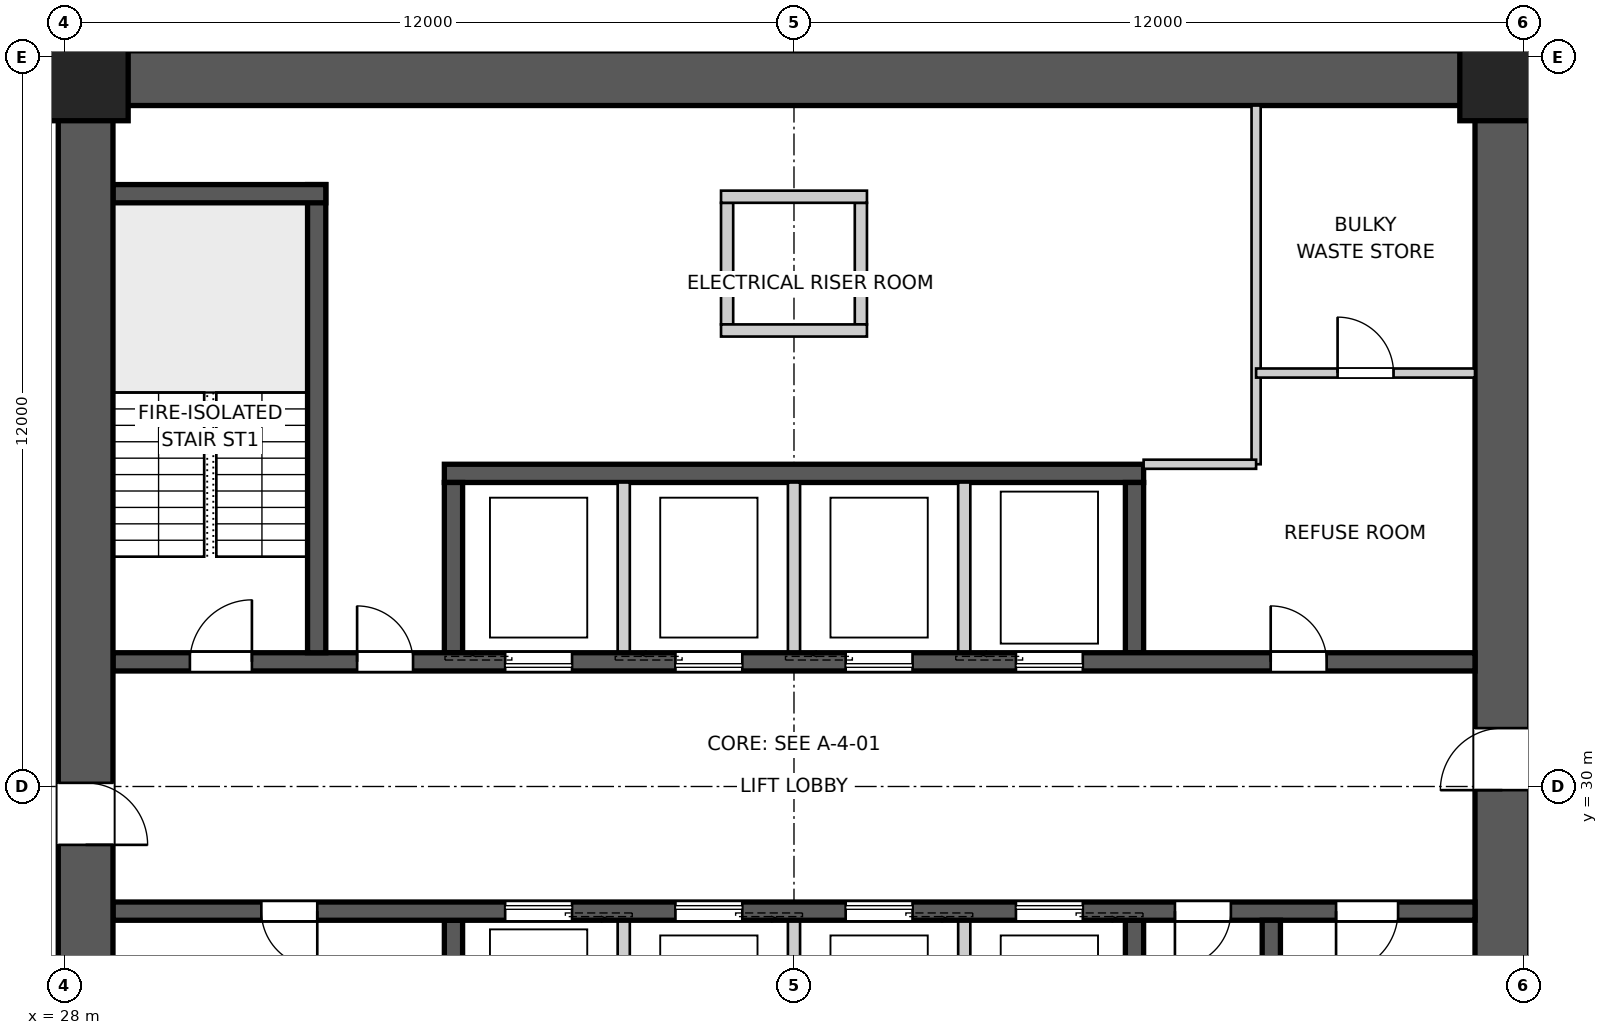
"""IFC4 building model, lengths in metres.
Left out: names, types, materials, properties, quantities, classifications, styles, units other than length and angle.
Written with IfcOpenShell. Run it as: python <this file> out.ifc"""

import sys

from ifc_helpers import new_model, si_unit, direction, frame, frame_2d, origin, origin_2d, place, context, subcontext, project, spatial, polyline, rectangle, outline, extrude, element, fill, save


model = new_model("IFC4")
c1 = context("Model", 3, precision=1e-05, world=origin(), true_north=direction((0.0, 1.0)))
c2 = subcontext(c1, "Body", "Model", "MODEL_VIEW")
j1 = project(units=[si_unit("LENGTHUNIT", "METRE"), si_unit("PLANEANGLEUNIT", "RADIAN")], contexts=[c1])
p1 = place(None, origin())
s1 = spatial("IfcSite", under=j1, at=p1, CompositionType="ELEMENT")
p2 = place(p1, origin())
s2 = spatial("IfcBuilding", under=s1, at=p2, CompositionType="ELEMENT")
p3 = place(p2, frame((0.0, 0.0, -7.4)))
s3 = spatial("IfcBuildingStorey", under=s2, at=p3, CompositionType="ELEMENT", Elevation=-7.4)
p4 = place(p3, frame((28.8, 41.65, -0.4), z_axis=(0.0, 0.0, 1.0), x_axis=(1.0, 0.0, 0.0)))
e1 = element("IfcWall", 1, at=p4, inside=s3, PredefinedType="SHEAR", context=c2, shape_type="SweptSolid", body=[
    extrude(outline(polyline([(0.0, -0.45), (22.4, -0.45), (22.4, -0.025), (22.85, -0.025), (22.85, 0.025), (22.4, 0.025), (22.4, 0.45), (0.0, 0.45), (0.0, 0.025), (-0.45, 0.025), (-0.45, -0.025), (0.0, -0.025), (0.0, -0.45)])), origin(), (0.0, 0.0, 1.0), 4.1),
])
p5 = place(p3, frame((51.65, 18.8, -0.4), z_axis=(0.0, 0.0, 1.0), x_axis=(0.0, 1.0, 0.0)))
e2 = element("IfcWall", 2, at=p5, inside=s3, PredefinedType="SHEAR", context=c2, shape_type="SweptSolid", body=[
    extrude(outline(polyline([(0.0, -0.45), (22.4, -0.45), (22.4, -0.025), (22.85, -0.025), (22.85, 0.025), (22.4, 0.025), (22.4, 0.45), (0.0, 0.45), (0.0, 0.025), (-0.45, 0.025), (-0.45, -0.025), (0.0, -0.025), (0.0, -0.45)])), origin(), (0.0, 0.0, 1.0), 4.1),
])
p6 = place(p5, frame((11.14, 0.0, 0.4)))
e3 = element("IfcOpeningElement", 3, at=p6, cuts=e2, PredefinedType="OPENING", context=c2, shape_type="SweptSolid", body=[
    extrude(rectangle(XDim=1.02, YDim=2.4, at=frame_2d((0.51, 1.2))), frame((0.0, 0.46, 0.0), z_axis=(0.0, -1.0, 0.0), x_axis=(1.0, 0.0, 0.0)), (0.0, 0.0, 1.0), 0.92),
])
p7 = place(p3, frame((28.35, 41.2, -0.4), z_axis=(0.0, 0.0, 1.0), x_axis=(0.0, -1.0, 0.0)))
e4 = element("IfcWall", 4, at=p7, inside=s3, PredefinedType="SHEAR", context=c2, shape_type="SweptSolid", body=[
    extrude(outline(polyline([(0.0, -0.45), (22.4, -0.45), (22.4, -0.025), (22.85, -0.025), (22.85, 0.025), (22.4, 0.025), (22.4, 0.45), (0.0, 0.45), (0.0, 0.025), (-0.45, 0.025), (-0.45, -0.025), (0.0, -0.025), (0.0, -0.45)])), origin(), (0.0, 0.0, 1.0), 4.1),
])
p8 = place(p7, frame((11.14, 0.0, 0.4)))
e5 = element("IfcOpeningElement", 5, at=p8, cuts=e4, PredefinedType="OPENING", context=c2, shape_type="SweptSolid", body=[
    extrude(rectangle(XDim=1.02, YDim=2.4, at=frame_2d((0.51, 1.2))), frame((0.0, 0.46, 0.0), z_axis=(0.0, -1.0, 0.0), x_axis=(1.0, 0.0, 0.0)), (0.0, 0.0, 1.0), 0.92),
])
p9 = place(p3, frame((28.8, 32.05, -0.4), z_axis=(0.0, 0.0, 1.0), x_axis=(1.0, 0.0, 0.0)))
e6 = element("IfcWall", 6, at=p9, inside=s3, PredefinedType="SHEAR", context=c2, shape_type="SweptSolid", body=[
    extrude(rectangle(XDim=22.4, YDim=0.3, at=frame_2d((11.2, 0.0))), origin(), (0.0, 0.0, 1.0), 4.1),
])
p10 = place(p9, frame((19.04, 0.0, 0.4)))
e7 = element("IfcOpeningElement", 7, at=p10, cuts=e6, PredefinedType="OPENING", context=c2, shape_type="SweptSolid", body=[
    extrude(rectangle(XDim=0.92, YDim=2.1, at=frame_2d((0.46, 1.05))), frame((0.0, 0.16, 0.0), z_axis=(0.0, -1.0, 0.0), x_axis=(1.0, 0.0, 0.0)), (0.0, 0.0, 1.0), 0.32),
])
p11 = place(p9, frame((1.265, 0.0, 0.4)))
e8 = element("IfcOpeningElement", 8, at=p11, cuts=e6, PredefinedType="OPENING", context=c2, shape_type="SweptSolid", body=[
    extrude(rectangle(XDim=1.02, YDim=2.1, at=frame_2d((0.51, 1.05))), frame((0.0, 0.16, 0.0), z_axis=(0.0, -1.0, 0.0), x_axis=(1.0, 0.0, 0.0)), (0.0, 0.0, 1.0), 0.32),
])
p12 = place(p9, frame((4.015, 0.0, 0.4)))
e9 = element("IfcOpeningElement", 9, at=p12, cuts=e6, PredefinedType="OPENING", context=c2, shape_type="SweptSolid", body=[
    extrude(rectangle(XDim=0.92, YDim=2.1, at=frame_2d((0.46, 1.05))), frame((0.0, 0.16, 0.0), z_axis=(0.0, -1.0, 0.0), x_axis=(1.0, 0.0, 0.0)), (0.0, 0.0, 1.0), 0.32),
])
p13 = place(p9, frame((6.45, 0.0, 0.4)))
e10 = element("IfcOpeningElement", 10, at=p13, cuts=e6, PredefinedType="OPENING", context=c2, shape_type="SweptSolid", body=[
    extrude(rectangle(XDim=1.1, YDim=2.1, at=frame_2d((0.55, 1.05))), frame((0.0, 0.16, 0.0), z_axis=(0.0, -1.0, 0.0), x_axis=(1.0, 0.0, 0.0)), (0.0, 0.0, 1.0), 0.32),
])
p14 = place(p9, frame((9.25, 0.0, 0.4)))
e11 = element("IfcOpeningElement", 11, at=p14, cuts=e6, PredefinedType="OPENING", context=c2, shape_type="SweptSolid", body=[
    extrude(rectangle(XDim=1.1, YDim=2.1, at=frame_2d((0.55, 1.05))), frame((0.0, 0.16, 0.0), z_axis=(0.0, -1.0, 0.0), x_axis=(1.0, 0.0, 0.0)), (0.0, 0.0, 1.0), 0.32),
])
p15 = place(p9, frame((12.05, 0.0, 0.4)))
e12 = element("IfcOpeningElement", 12, at=p15, cuts=e6, PredefinedType="OPENING", context=c2, shape_type="SweptSolid", body=[
    extrude(rectangle(XDim=1.1, YDim=2.1, at=frame_2d((0.55, 1.05))), frame((0.0, 0.16, 0.0), z_axis=(0.0, -1.0, 0.0), x_axis=(1.0, 0.0, 0.0)), (0.0, 0.0, 1.0), 0.32),
])
p16 = place(p9, frame((14.85, 0.0, 0.4)))
e13 = element("IfcOpeningElement", 13, at=p16, cuts=e6, PredefinedType="OPENING", context=c2, shape_type="SweptSolid", body=[
    extrude(rectangle(XDim=1.1, YDim=2.1, at=frame_2d((0.55, 1.05))), frame((0.0, 0.16, 0.0), z_axis=(0.0, -1.0, 0.0), x_axis=(1.0, 0.0, 0.0)), (0.0, 0.0, 1.0), 0.32),
])
p17 = place(p3, frame((51.2, 27.95, -0.4), z_axis=(0.0, 0.0, 1.0), x_axis=(-1.0, 0.0, 0.0)))
e14 = element("IfcWall", 14, at=p17, inside=s3, PredefinedType="SHEAR", context=c2, shape_type="SweptSolid", body=[
    extrude(rectangle(XDim=22.4, YDim=0.3, at=frame_2d((11.2, 0.0))), origin(), (0.0, 0.0, 1.0), 4.1),
])
p18 = place(p17, frame((19.04, 0.0, 0.4)))
e15 = element("IfcOpeningElement", 15, at=p18, cuts=e14, PredefinedType="OPENING", context=c2, shape_type="SweptSolid", body=[
    extrude(rectangle(XDim=0.92, YDim=2.1, at=frame_2d((0.46, 1.05))), frame((0.0, 0.16, 0.0), z_axis=(0.0, -1.0, 0.0), x_axis=(1.0, 0.0, 0.0)), (0.0, 0.0, 1.0), 0.32),
])
p19 = place(p17, frame((1.265, 0.0, 0.4)))
e16 = element("IfcOpeningElement", 16, at=p19, cuts=e14, PredefinedType="OPENING", context=c2, shape_type="SweptSolid", body=[
    extrude(rectangle(XDim=1.02, YDim=2.1, at=frame_2d((0.51, 1.05))), frame((0.0, 0.16, 0.0), z_axis=(0.0, -1.0, 0.0), x_axis=(1.0, 0.0, 0.0)), (0.0, 0.0, 1.0), 0.32),
])
p20 = place(p17, frame((4.015, 0.0, 0.4)))
e17 = element("IfcOpeningElement", 17, at=p20, cuts=e14, PredefinedType="OPENING", context=c2, shape_type="SweptSolid", body=[
    extrude(rectangle(XDim=0.92, YDim=2.1, at=frame_2d((0.46, 1.05))), frame((0.0, 0.16, 0.0), z_axis=(0.0, -1.0, 0.0), x_axis=(1.0, 0.0, 0.0)), (0.0, 0.0, 1.0), 0.32),
])
p21 = place(p17, frame((6.45, 0.0, 0.4)))
e18 = element("IfcOpeningElement", 18, at=p21, cuts=e14, PredefinedType="OPENING", context=c2, shape_type="SweptSolid", body=[
    extrude(rectangle(XDim=1.1, YDim=2.1, at=frame_2d((0.55, 1.05))), frame((0.0, 0.16, 0.0), z_axis=(0.0, -1.0, 0.0), x_axis=(1.0, 0.0, 0.0)), (0.0, 0.0, 1.0), 0.32),
])
p22 = place(p17, frame((9.25, 0.0, 0.4)))
e19 = element("IfcOpeningElement", 19, at=p22, cuts=e14, PredefinedType="OPENING", context=c2, shape_type="SweptSolid", body=[
    extrude(rectangle(XDim=1.1, YDim=2.1, at=frame_2d((0.55, 1.05))), frame((0.0, 0.16, 0.0), z_axis=(0.0, -1.0, 0.0), x_axis=(1.0, 0.0, 0.0)), (0.0, 0.0, 1.0), 0.32),
])
p23 = place(p17, frame((12.05, 0.0, 0.4)))
e20 = element("IfcOpeningElement", 20, at=p23, cuts=e14, PredefinedType="OPENING", context=c2, shape_type="SweptSolid", body=[
    extrude(rectangle(XDim=1.1, YDim=2.1, at=frame_2d((0.55, 1.05))), frame((0.0, 0.16, 0.0), z_axis=(0.0, -1.0, 0.0), x_axis=(1.0, 0.0, 0.0)), (0.0, 0.0, 1.0), 0.32),
])
p24 = place(p17, frame((14.85, 0.0, 0.4)))
e21 = element("IfcOpeningElement", 21, at=p24, cuts=e14, PredefinedType="OPENING", context=c2, shape_type="SweptSolid", body=[
    extrude(rectangle(XDim=1.1, YDim=2.1, at=frame_2d((0.55, 1.05))), frame((0.0, 0.16, 0.0), z_axis=(0.0, -1.0, 0.0), x_axis=(1.0, 0.0, 0.0)), (0.0, 0.0, 1.0), 0.32),
])
p25 = place(p3, frame((34.25, 35.15, -0.4), z_axis=(0.0, 0.0, 1.0), x_axis=(1.0, 0.0, 0.0)))
e22 = element("IfcWall", 22, at=p25, inside=s3, PredefinedType="SHEAR", context=c2, shape_type="SweptSolid", body=[
    extrude(rectangle(XDim=11.5, YDim=0.3, at=frame_2d((5.75, 0.0))), origin(), (0.0, 0.0, 1.0), 4.1),
])
for number, where, z_axis, x_axis in (
    (23, (34.4, 32.2, -0.4), (0.0, 0.0, 1.0), (0.0, 1.0, 0.0)),
    (24, (45.6, 27.8, -0.4), (0.0, 0.0, 1.0), (0.0, -1.0, 0.0)),
):
    element("IfcWall", number, at=place(p3, frame(where, z_axis=z_axis, x_axis=x_axis)), inside=s3, PredefinedType="SHEAR", context=c2, shape_type="SweptSolid", body=[
        extrude(rectangle(XDim=2.8, YDim=0.3, at=frame_2d((1.4, 0.0))), origin(), (0.0, 0.0, 1.0), 4.1),
    ])
for number, where, z_axis, x_axis in (
    (25, (37.2, 32.2, -0.4), (0.0, 0.0, 1.0), (0.0, 1.0, 0.0)),
    (26, (42.8, 27.8, -0.4), (0.0, 0.0, 1.0), (0.0, -1.0, 0.0)),
    (27, (40.0, 32.2, -0.4), (0.0, 0.0, 1.0), (0.0, 1.0, 0.0)),
    (28, (40.0, 27.8, -0.4), (0.0, 0.0, 1.0), (0.0, -1.0, 0.0)),
    (29, (42.8, 32.2, -0.4), (0.0, 0.0, 1.0), (0.0, 1.0, 0.0)),
    (30, (37.2, 27.8, -0.4), (0.0, 0.0, 1.0), (0.0, -1.0, 0.0)),
):
    element("IfcWall", number, at=place(p3, frame(where, z_axis=z_axis, x_axis=x_axis)), inside=s3, PredefinedType="SOLIDWALL", context=c2, shape_type="SweptSolid", body=[
        extrude(rectangle(XDim=2.8, YDim=0.2, at=frame_2d((1.4, 0.0))), origin(), (0.0, 0.0, 1.0), 4.1),
    ])
for number, where, z_axis, x_axis in (
    (31, (45.6, 32.2, -0.4), (0.0, 0.0, 1.0), (0.0, 1.0, 0.0)),
    (32, (34.4, 27.8, -0.4), (0.0, 0.0, 1.0), (0.0, -1.0, 0.0)),
):
    element("IfcWall", number, at=place(p3, frame(where, z_axis=z_axis, x_axis=x_axis)), inside=s3, PredefinedType="SHEAR", context=c2, shape_type="SweptSolid", body=[
        extrude(rectangle(XDim=2.8, YDim=0.3, at=frame_2d((1.4, 0.0))), origin(), (0.0, 0.0, 1.0), 4.1),
    ])
p26 = place(p3, frame((32.15, 32.2, -0.4), z_axis=(0.0, 0.0, 1.0), x_axis=(0.0, 1.0, 0.0)))
e33 = element("IfcWall", 33, at=p26, inside=s3, PredefinedType="SHEAR", context=c2, shape_type="SweptSolid", body=[
    extrude(rectangle(XDim=7.7, YDim=0.3, at=frame_2d((3.85, 0.0))), origin(), (0.0, 0.0, 1.0), 4.1),
])
p27 = place(p3, frame((28.8, 39.75, -0.4), z_axis=(0.0, 0.0, 1.0), x_axis=(1.0, 0.0, 0.0)))
e34 = element("IfcWall", 34, at=p27, inside=s3, PredefinedType="SHEAR", context=c2, shape_type="SweptSolid", body=[
    extrude(rectangle(XDim=3.5, YDim=0.3, at=frame_2d((1.75, 0.0))), origin(), (0.0, 0.0, 1.0), 4.1),
])
p28 = place(p3, frame((47.85, 27.8, -0.4), z_axis=(0.0, 0.0, 1.0), x_axis=(0.0, -1.0, 0.0)))
e35 = element("IfcWall", 35, at=p28, inside=s3, PredefinedType="SHEAR", context=c2, shape_type="SweptSolid", body=[
    extrude(rectangle(XDim=7.7, YDim=0.3, at=frame_2d((3.85, 0.0))), origin(), (0.0, 0.0, 1.0), 4.1),
])
for number, where, z_axis, x_axis in (
    (36, (38.9, 37.6, -0.4), (0.0, 0.0, 1.0), (0.0, 1.0, 0.0)),
    (37, (41.1, 37.6, -0.4), (0.0, 0.0, 1.0), (0.0, 1.0, 0.0)),
):
    element("IfcWall", number, at=place(p3, frame(where, z_axis=z_axis, x_axis=x_axis)), inside=s3, PredefinedType="SOLIDWALL", context=c2, shape_type="SweptSolid", body=[
        extrude(rectangle(XDim=2.0, YDim=0.2, at=frame_2d((1.0, 0.0))), origin(), (0.0, 0.0, 1.0), 4.1),
    ])
for number, where, z_axis, x_axis in (
    (38, (38.8, 37.5, -0.4), (0.0, 0.0, 1.0), (1.0, 0.0, 0.0)),
    (39, (38.8, 39.7, -0.4), (0.0, 0.0, 1.0), (1.0, 0.0, 0.0)),
):
    element("IfcWall", number, at=place(p3, frame(where, z_axis=z_axis, x_axis=x_axis)), inside=s3, PredefinedType="SOLIDWALL", context=c2, shape_type="SweptSolid", body=[
        extrude(rectangle(XDim=2.4, YDim=0.2, at=frame_2d((1.2, 0.0))), origin(), (0.0, 0.0, 1.0), 4.1),
    ])
for number, where, z_axis, x_axis in (
    (40, (51.65, 41.65, -0.4), (0.0, 0.0, 1.0), (1.0, 0.0, 0.0)),
    (41, (28.35, 41.65, -0.4), (0.0, 0.0, 1.0), (1.0, 0.0, 0.0)),
):
    element("IfcColumn", number, at=place(p3, frame(where, z_axis=z_axis, x_axis=x_axis)), inside=s3, PredefinedType="COLUMN", context=c2, shape_type="SweptSolid", body=[
        extrude(rectangle(XDim=1.4, YDim=1.4, at=origin_2d()), origin(), (0.0, 0.0, 1.0), 4.1),
    ])
p29 = place(p3, frame((47.6, 41.2, 0.0), z_axis=(0.0, 0.0, 1.0), x_axis=(0.0, -1.0, 0.0)))
e42 = element("IfcWall", 42, at=p29, inside=s3, PredefinedType="SOLIDWALL", context=c2, shape_type="SweptSolid", body=[
    extrude(rectangle(XDim=5.9, YDim=0.15, at=frame_2d((2.95, 0.0))), origin(), (0.0, 0.0, 1.0), 3.35),
])
p30 = place(p3, frame((47.6, 35.3, 0.0), z_axis=(0.0, 0.0, 1.0), x_axis=(-1.0, 0.0, 0.0)))
e43 = element("IfcWall", 43, at=p30, inside=s3, PredefinedType="SOLIDWALL", context=c2, shape_type="SweptSolid", body=[
    extrude(rectangle(XDim=1.85, YDim=0.15, at=frame_2d((0.925, 0.0))), origin(), (0.0, 0.0, 1.0), 3.35),
])
p31 = place(p3, frame((47.6, 36.8, 0.0), z_axis=(0.0, 0.0, 1.0), x_axis=(1.0, 0.0, 0.0)))
e44 = element("IfcWall", 44, at=p31, inside=s3, PredefinedType="SOLIDWALL", context=c2, shape_type="SweptSolid", body=[
    extrude(rectangle(XDim=3.6, YDim=0.15, at=frame_2d((1.8, 0.0))), origin(), (0.0, 0.0, 1.0), 3.35),
])
p32 = place(p31, frame((1.34, 0.0, 0.0)))
e45 = element("IfcOpeningElement", 45, at=p32, cuts=e44, PredefinedType="OPENING", context=c2, shape_type="SweptSolid", body=[
    extrude(rectangle(XDim=0.92, YDim=2.1, at=frame_2d((0.46, 1.05))), frame((0.0, 0.085, 0.0), z_axis=(0.0, -1.0, 0.0), x_axis=(1.0, 0.0, 0.0)), (0.0, 0.0, 1.0), 0.17),
])
p33 = place(p10, origin())
e46 = element("IfcDoor", 46, at=p33, inside=s3, OperationType="SINGLE_SWING_LEFT", PredefinedType="DOOR", context=c2, shape_type="SweptSolid", body=[
    extrude(rectangle(XDim=0.92, YDim=2.1, at=frame_2d((0.46, 1.05))), frame((0.0, 0.025, 0.0), z_axis=(0.0, -1.0, 0.0), x_axis=(1.0, 0.0, 0.0)), (0.0, 0.0, 1.0), 0.05),
])
fill(e7, e46)
p34 = place(p18, origin())
e47 = element("IfcDoor", 47, at=p34, inside=s3, OperationType="SINGLE_SWING_LEFT", PredefinedType="DOOR", context=c2, shape_type="SweptSolid", body=[
    extrude(rectangle(XDim=0.92, YDim=2.1, at=frame_2d((0.46, 1.05))), frame((0.0, 0.025, 0.0), z_axis=(0.0, -1.0, 0.0), x_axis=(1.0, 0.0, 0.0)), (0.0, 0.0, 1.0), 0.05),
])
fill(e15, e47)
p35 = place(p19, origin())
e48 = element("IfcDoor", 48, at=p35, inside=s3, OperationType="SINGLE_SWING_RIGHT", PredefinedType="DOOR", context=c2, shape_type="SweptSolid", body=[
    extrude(rectangle(XDim=1.02, YDim=2.1, at=frame_2d((0.51, 1.05))), frame((0.0, 0.025, 0.0), z_axis=(0.0, -1.0, 0.0), x_axis=(1.0, 0.0, 0.0)), (0.0, 0.0, 1.0), 0.05),
])
fill(e16, e48)
p36 = place(p11, origin())
e49 = element("IfcDoor", 49, at=p36, inside=s3, OperationType="SINGLE_SWING_RIGHT", PredefinedType="DOOR", context=c2, shape_type="SweptSolid", body=[
    extrude(rectangle(XDim=1.02, YDim=2.1, at=frame_2d((0.51, 1.05))), frame((0.0, 0.025, 0.0), z_axis=(0.0, -1.0, 0.0), x_axis=(1.0, 0.0, 0.0)), (0.0, 0.0, 1.0), 0.05),
])
fill(e8, e49)
p37 = place(p12, origin())
e50 = element("IfcDoor", 50, at=p37, inside=s3, OperationType="SINGLE_SWING_LEFT", PredefinedType="DOOR", context=c2, shape_type="SweptSolid", body=[
    extrude(rectangle(XDim=0.92, YDim=2.1, at=frame_2d((0.46, 1.05))), frame((0.0, 0.025, 0.0), z_axis=(0.0, -1.0, 0.0), x_axis=(1.0, 0.0, 0.0)), (0.0, 0.0, 1.0), 0.05),
])
fill(e9, e50)
p38 = place(p20, origin())
e51 = element("IfcDoor", 51, at=p38, inside=s3, OperationType="SINGLE_SWING_RIGHT", PredefinedType="DOOR", context=c2, shape_type="SweptSolid", body=[
    extrude(rectangle(XDim=0.92, YDim=2.1, at=frame_2d((0.46, 1.05))), frame((0.0, 0.025, 0.0), z_axis=(0.0, -1.0, 0.0), x_axis=(1.0, 0.0, 0.0)), (0.0, 0.0, 1.0), 0.05),
])
fill(e17, e51)
p39 = place(p32, origin())
e52 = element("IfcDoor", 52, at=p39, inside=s3, OperationType="SINGLE_SWING_LEFT", PredefinedType="DOOR", context=c2, shape_type="SweptSolid", body=[
    extrude(rectangle(XDim=0.92, YDim=2.1, at=frame_2d((0.46, 1.05))), frame((0.0, 0.025, 0.0), z_axis=(0.0, -1.0, 0.0), x_axis=(1.0, 0.0, 0.0)), (0.0, 0.0, 1.0), 0.05),
])
fill(e45, e52)
p40 = place(p6, origin())
e53 = element("IfcDoor", 53, at=p40, inside=s3, OperationType="SINGLE_SWING_LEFT", PredefinedType="DOOR", context=c2, shape_type="SweptSolid", body=[
    extrude(rectangle(XDim=1.02, YDim=2.4, at=frame_2d((0.51, 1.2))), frame((0.0, 0.025, 0.0), z_axis=(0.0, -1.0, 0.0), x_axis=(1.0, 0.0, 0.0)), (0.0, 0.0, 1.0), 0.05),
])
fill(e3, e53)
p41 = place(p8, origin())
e54 = element("IfcDoor", 54, at=p41, inside=s3, OperationType="SINGLE_SWING_RIGHT", PredefinedType="DOOR", context=c2, shape_type="SweptSolid", body=[
    extrude(rectangle(XDim=1.02, YDim=2.4, at=frame_2d((0.51, 1.2))), frame((0.0, 0.025, 0.0), z_axis=(0.0, -1.0, 0.0), x_axis=(1.0, 0.0, 0.0)), (0.0, 0.0, 1.0), 0.05),
])
fill(e5, e54)
p42 = place(p13, origin())
e55 = element("IfcDoor", 55, at=p42, inside=s3, OperationType="SLIDING_TO_LEFT", PredefinedType="DOOR", context=c2, shape_type="SweptSolid", body=[
    extrude(rectangle(XDim=1.1, YDim=2.1, at=frame_2d((0.55, 1.05))), frame((0.0, 0.025, 0.0), z_axis=(0.0, -1.0, 0.0), x_axis=(1.0, 0.0, 0.0)), (0.0, 0.0, 1.0), 0.05),
])
fill(e10, e55)
p43 = place(p21, origin())
e56 = element("IfcDoor", 56, at=p43, inside=s3, OperationType="SLIDING_TO_LEFT", PredefinedType="DOOR", context=c2, shape_type="SweptSolid", body=[
    extrude(rectangle(XDim=1.1, YDim=2.1, at=frame_2d((0.55, 1.05))), frame((0.0, 0.025, 0.0), z_axis=(0.0, -1.0, 0.0), x_axis=(1.0, 0.0, 0.0)), (0.0, 0.0, 1.0), 0.05),
])
fill(e18, e56)
p44 = place(p14, origin())
e57 = element("IfcDoor", 57, at=p44, inside=s3, OperationType="SLIDING_TO_LEFT", PredefinedType="DOOR", context=c2, shape_type="SweptSolid", body=[
    extrude(rectangle(XDim=1.1, YDim=2.1, at=frame_2d((0.55, 1.05))), frame((0.0, 0.025, 0.0), z_axis=(0.0, -1.0, 0.0), x_axis=(1.0, 0.0, 0.0)), (0.0, 0.0, 1.0), 0.05),
])
fill(e11, e57)
p45 = place(p22, origin())
e58 = element("IfcDoor", 58, at=p45, inside=s3, OperationType="SLIDING_TO_LEFT", PredefinedType="DOOR", context=c2, shape_type="SweptSolid", body=[
    extrude(rectangle(XDim=1.1, YDim=2.1, at=frame_2d((0.55, 1.05))), frame((0.0, 0.025, 0.0), z_axis=(0.0, -1.0, 0.0), x_axis=(1.0, 0.0, 0.0)), (0.0, 0.0, 1.0), 0.05),
])
fill(e19, e58)
p46 = place(p15, origin())
e59 = element("IfcDoor", 59, at=p46, inside=s3, OperationType="SLIDING_TO_LEFT", PredefinedType="DOOR", context=c2, shape_type="SweptSolid", body=[
    extrude(rectangle(XDim=1.1, YDim=2.1, at=frame_2d((0.55, 1.05))), frame((0.0, 0.025, 0.0), z_axis=(0.0, -1.0, 0.0), x_axis=(1.0, 0.0, 0.0)), (0.0, 0.0, 1.0), 0.05),
])
fill(e12, e59)
p47 = place(p23, origin())
e60 = element("IfcDoor", 60, at=p47, inside=s3, OperationType="SLIDING_TO_LEFT", PredefinedType="DOOR", context=c2, shape_type="SweptSolid", body=[
    extrude(rectangle(XDim=1.1, YDim=2.1, at=frame_2d((0.55, 1.05))), frame((0.0, 0.025, 0.0), z_axis=(0.0, -1.0, 0.0), x_axis=(1.0, 0.0, 0.0)), (0.0, 0.0, 1.0), 0.05),
])
fill(e20, e60)
p48 = place(p16, origin())
e61 = element("IfcDoor", 61, at=p48, inside=s3, OperationType="SLIDING_TO_LEFT", PredefinedType="DOOR", context=c2, shape_type="SweptSolid", body=[
    extrude(rectangle(XDim=1.1, YDim=2.1, at=frame_2d((0.55, 1.05))), frame((0.0, 0.025, 0.0), z_axis=(0.0, -1.0, 0.0), x_axis=(1.0, 0.0, 0.0)), (0.0, 0.0, 1.0), 0.05),
])
fill(e13, e61)
p49 = place(p24, origin())
e62 = element("IfcDoor", 62, at=p49, inside=s3, OperationType="SLIDING_TO_LEFT", PredefinedType="DOOR", context=c2, shape_type="SweptSolid", body=[
    extrude(rectangle(XDim=1.1, YDim=2.1, at=frame_2d((0.55, 1.05))), frame((0.0, 0.025, 0.0), z_axis=(0.0, -1.0, 0.0), x_axis=(1.0, 0.0, 0.0)), (0.0, 0.0, 1.0), 0.05),
])
fill(e21, e62)
save(model, sys.argv[1])
